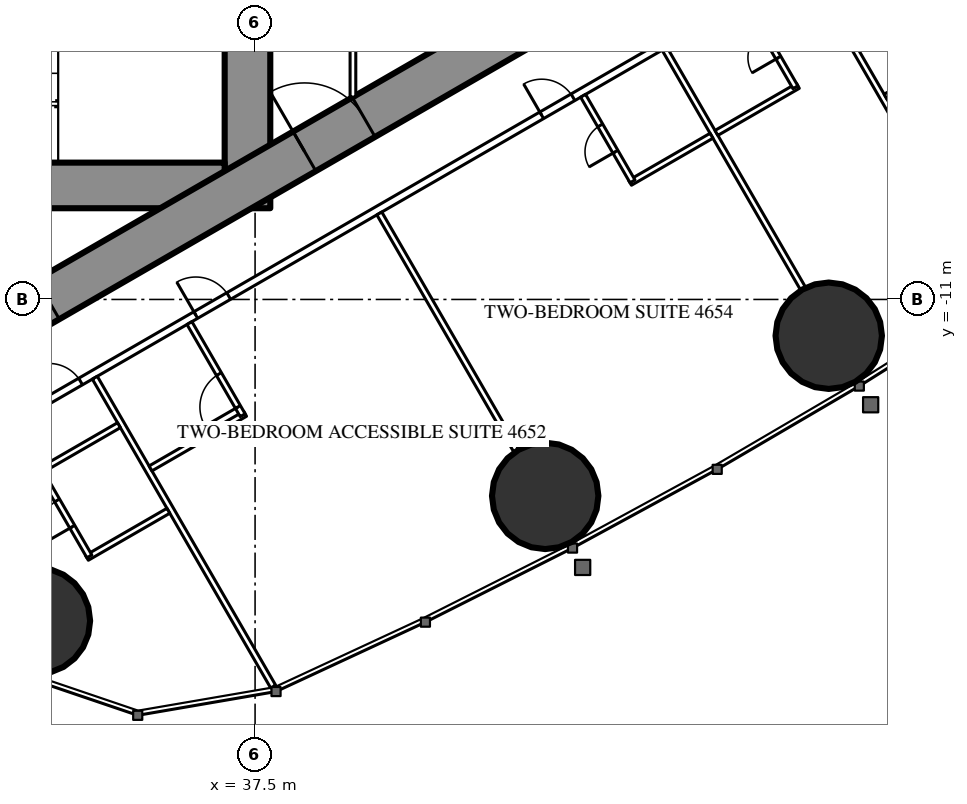
"""IFC4 building model, lengths in metres.
Left out: names, types, materials, properties, quantities, classifications, styles, units other than length and angle.
Written with IfcOpenShell. Run it as: python <this file> out.ifc"""

import sys

from ifc_helpers import new_model, si_unit, direction, frame, frame_2d, origin, origin_2d, place, context, subcontext, project, spatial, rectangle, circle, extrude, element, fill, save


model = new_model("IFC4")
c1 = context("Model", 3, precision=1e-05, world=origin(), true_north=direction((0.0, 1.0)))
c2 = subcontext(c1, "Body", "Model", "MODEL_VIEW")
j1 = project(units=[si_unit("LENGTHUNIT", "METRE"), si_unit("PLANEANGLEUNIT", "RADIAN")], contexts=[c1])
p1 = place(None, origin())
s1 = spatial("IfcSite", under=j1, at=p1, CompositionType="ELEMENT")
p2 = place(p1, origin())
s2 = spatial("IfcBuilding", under=s1, at=p2, CompositionType="ELEMENT")
p3 = place(p2, frame((0.0, 0.0, 173.8)))
s3 = spatial("IfcBuildingStorey", under=s2, at=p3, CompositionType="ELEMENT", Elevation=173.8)
for number, where, z_axis, x_axis in (
    (1, (31.76, -19.456, 0.0), (0.0, 0.0, 1.0), (1.0, 0.0, 0.0)),
    (2, (45.134, -16.168, 0.0), (0.0, 0.0, 1.0), (1.0, 0.0, 0.0)),
    (3, (52.594, -11.955, 0.0), (0.0, 0.0, 1.0), (1.0, 0.0, 0.0)),
):
    element("IfcColumn", number, at=place(p3, frame(where, z_axis=z_axis, x_axis=x_axis)), inside=s3, PredefinedType="COLUMN", context=c2, shape_type="SweptSolid", body=[
        extrude(circle(Radius=1.4, at=origin_2d()), origin(), (0.0, 0.0, 1.0), 3.5),
    ])
p4 = place(p3, frame((37.3, -8.6, 0.0), z_axis=(0.0, 0.0, 1.0), x_axis=(0.0, 1.0, 0.0)))
e4 = element("IfcWall", 4, at=p4, inside=s3, PredefinedType="SHEAR", context=c2, shape_type="SweptSolid", body=[
    extrude(rectangle(XDim=17.2, YDim=1.2, at=frame_2d((8.6, 0.0))), origin(), (0.0, 0.0, 1.0), 3.5),
])
p5 = place(p4, frame((7.7, 0.0, 0.0)))
e5 = element("IfcOpeningElement", 5, at=p5, cuts=e4, PredefinedType="OPENING", context=c2, shape_type="SweptSolid", body=[
    extrude(rectangle(XDim=1.8, YDim=2.2, at=frame_2d((0.9, 1.1))), frame((0.0, 0.61, 0.0), z_axis=(0.0, -1.0, 0.0), x_axis=(1.0, 0.0, 0.0)), (0.0, 0.0, 1.0), 1.22),
])
p6 = place(p3, frame((28.3, -8.0, 0.0), z_axis=(0.0, 0.0, 1.0), x_axis=(1.0, 0.0, 0.0)))
e6 = element("IfcWall", 6, at=p6, inside=s3, PredefinedType="SHEAR", context=c2, shape_type="SweptSolid", body=[
    extrude(rectangle(XDim=8.4, YDim=1.2, at=frame_2d((4.2, 0.0))), origin(), (0.0, 0.0, 1.0), 3.5),
])
p7 = place(p6, frame((0.25, 0.0, 0.0)))
e7 = element("IfcOpeningElement", 7, at=p7, cuts=e6, PredefinedType="OPENING", context=c2, shape_type="SweptSolid", body=[
    extrude(rectangle(XDim=1.0, YDim=2.2, at=frame_2d((0.5, 1.1))), frame((0.0, 0.61, 0.0), z_axis=(0.0, -1.0, 0.0), x_axis=(1.0, 0.0, 0.0)), (0.0, 0.0, 1.0), 1.22),
])
p8 = place(p3, frame((27.2, -13.8, 0.0), z_axis=(0.0, 0.0, 1.0), x_axis=(0.866027159892, 0.499996958321, 0.0)))
e8 = element("IfcWall", 8, at=p8, inside=s3, PredefinedType="SHEAR", context=c2, shape_type="SweptSolid", body=[
    extrude(rectangle(XDim=27.947, YDim=1.2, at=frame_2d((13.973, 0.0))), origin(), (0.0, 0.0, 1.0), 3.5),
])
p9 = place(p8, frame((4.6, 0.0, 0.0)))
e9 = element("IfcOpeningElement", 9, at=p9, cuts=e8, PredefinedType="OPENING", context=c2, shape_type="SweptSolid", body=[
    extrude(rectangle(XDim=1.0, YDim=2.2, at=frame_2d((0.5, 1.1))), frame((0.0, 0.61, 0.0), z_axis=(0.0, -1.0, 0.0), x_axis=(1.0, 0.0, 0.0)), (0.0, 0.0, 1.0), 1.22),
])
p10 = place(p8, frame((13.395, 0.0, 0.0)))
e10 = element("IfcOpeningElement", 10, at=p10, cuts=e8, PredefinedType="OPENING", context=c2, shape_type="SweptSolid", body=[
    extrude(rectangle(XDim=1.8, YDim=2.2, at=frame_2d((0.9, 1.1))), frame((0.0, 0.61, 0.0), z_axis=(0.0, -1.0, 0.0), x_axis=(1.0, 0.0, 0.0)), (0.0, 0.0, 1.0), 1.22),
])
p11 = place(p3, frame((27.959, -16.017, 0.0), z_axis=(0.0, 0.0, 1.0), x_axis=(0.866024151371, 0.500002169237, 0.0)))
e11 = element("IfcWall", 11, at=p11, inside=s3, PredefinedType="PARTITIONING", context=c2, shape_type="SweptSolid", body=[
    extrude(rectangle(XDim=32.034, YDim=0.2, at=frame_2d((16.017, 0.0))), origin(), (0.0, 0.0, 1.0), 3.25),
])
p12 = place(p11, frame((4.765, 0.0, 0.0)))
e12 = element("IfcOpeningElement", 12, at=p12, cuts=e11, PredefinedType="OPENING", context=c2, shape_type="SweptSolid", body=[
    extrude(rectangle(XDim=0.95, YDim=2.2, at=frame_2d((0.475, 1.1))), frame((0.0, 0.11, 0.0), z_axis=(0.0, -1.0, 0.0), x_axis=(1.0, 0.0, 0.0)), (0.0, 0.0, 1.0), 0.22),
])
p13 = place(p11, frame((9.215, 0.0, 0.0)))
e13 = element("IfcOpeningElement", 13, at=p13, cuts=e11, PredefinedType="OPENING", context=c2, shape_type="SweptSolid", body=[
    extrude(rectangle(XDim=1.0, YDim=2.2, at=frame_2d((0.5, 1.1))), frame((0.0, 0.11, 0.0), z_axis=(0.0, -1.0, 0.0), x_axis=(1.0, 0.0, 0.0)), (0.0, 0.0, 1.0), 0.22),
])
p14 = place(p11, frame((19.725, 0.0, 0.0)))
e14 = element("IfcOpeningElement", 14, at=p14, cuts=e11, PredefinedType="OPENING", context=c2, shape_type="SweptSolid", body=[
    extrude(rectangle(XDim=0.95, YDim=2.2, at=frame_2d((0.475, 1.1))), frame((0.0, 0.11, 0.0), z_axis=(0.0, -1.0, 0.0), x_axis=(1.0, 0.0, 0.0)), (0.0, 0.0, 1.0), 0.22),
])
p15 = place(p11, frame((26.125, 0.0, 0.0)))
e15 = element("IfcOpeningElement", 15, at=p15, cuts=e11, PredefinedType="OPENING", context=c2, shape_type="SweptSolid", body=[
    extrude(rectangle(XDim=0.95, YDim=2.2, at=frame_2d((0.475, 1.1))), frame((0.0, 0.11, 0.0), z_axis=(0.0, -1.0, 0.0), x_axis=(1.0, 0.0, 0.0)), (0.0, 0.0, 1.0), 0.22),
])
p16 = place(p11, frame((28.106, 0.0, 0.0)))
e16 = element("IfcOpeningElement", 16, at=p16, cuts=e11, PredefinedType="OPENING", context=c2, shape_type="SweptSolid", body=[
    extrude(rectangle(XDim=0.95, YDim=2.2, at=frame_2d((0.475, 1.1))), frame((0.0, 0.11, 0.0), z_axis=(0.0, -1.0, 0.0), x_axis=(1.0, 0.0, 0.0)), (0.0, 0.0, 1.0), 0.22),
])
p17 = place(p3, frame((33.284, -13.059, 0.0), z_axis=(0.0, 0.0, 1.0), x_axis=(0.499985904184, -0.866033541855, 0.0)))
e17 = element("IfcWall", 17, at=p17, inside=s3, PredefinedType="PARTITIONING", context=c2, shape_type="SweptSolid", body=[
    extrude(rectangle(XDim=9.385, YDim=0.15, at=frame_2d((4.693, 0.0))), origin(), (0.0, 0.0, 1.0), 3.25),
])
p18 = place(p3, frame((40.769, -8.737, 0.0), z_axis=(0.0, 0.0, 1.0), x_axis=(0.500013115284, -0.866017831539, 0.0)))
e18 = element("IfcWall", 18, at=p18, inside=s3, PredefinedType="PARTITIONING", context=c2, shape_type="SweptSolid", body=[
    extrude(rectangle(XDim=7.198, YDim=0.15, at=frame_2d((3.599, 0.0))), origin(), (0.0, 0.0, 1.0), 2.3),
])
p19 = place(p3, frame((48.275, -4.404, 0.0), z_axis=(0.0, 0.0, 1.0), x_axis=(0.500006004368, -0.866021937133, 0.0)))
e19 = element("IfcWall", 19, at=p19, inside=s3, PredefinedType="PARTITIONING", context=c2, shape_type="SweptSolid", body=[
    extrude(rectangle(XDim=7.279, YDim=0.15, at=frame_2d((3.64, 0.0))), origin(), (0.0, 0.0, 1.0), 2.3),
])
p20 = place(p3, frame((52.025, -2.238, 0.0), z_axis=(0.0, 0.0, 1.0), x_axis=(0.499983785035, -0.866034765296, 0.0)))
e20 = element("IfcWall", 20, at=p20, inside=s3, PredefinedType="PARTITIONING", context=c2, shape_type="SweptSolid", body=[
    extrude(rectangle(XDim=7.116, YDim=0.15, at=frame_2d((3.558, 0.0))), origin(), (0.0, 0.0, 1.0), 2.3),
])
p21 = place(p3, frame((33.075, -17.798, 0.0), z_axis=(0.0, 0.0, 1.0), x_axis=(0.866006523861, 0.500032699561, 0.0)))
e21 = element("IfcWall", 21, at=p21, inside=s3, PredefinedType="PARTITIONING", context=c2, shape_type="SweptSolid", body=[
    extrude(rectangle(XDim=2.475, YDim=0.15, at=frame_2d((1.237, 0.0))), origin(), (0.0, 0.0, 1.0), 3.25),
])
p22 = place(p3, frame((31.84, -15.509, 0.0), z_axis=(0.0, 0.0, 1.0), x_axis=(0.500006934395, -0.866021400173, 0.0)))
e22 = element("IfcWall", 22, at=p22, inside=s3, PredefinedType="PARTITIONING", context=c2, shape_type="SweptSolid", body=[
    extrude(rectangle(XDim=2.6, YDim=0.15, at=frame_2d((1.3, 0.0))), origin(), (0.0, 0.0, 1.0), 3.25),
])
p23 = place(p22, frame((0.9, 0.0, 0.0)))
e23 = element("IfcOpeningElement", 23, at=p23, cuts=e22, PredefinedType="OPENING", context=c2, shape_type="SweptSolid", body=[
    extrude(rectangle(XDim=0.8, YDim=2.2, at=frame_2d((0.4, 1.1))), frame((0.0, 0.085, 0.0), z_axis=(0.0, -1.0, 0.0), x_axis=(1.0, 0.0, 0.0)), (0.0, 0.0, 1.0), 0.17),
])
p24 = place(p3, frame((31.775, -15.546, 0.0), z_axis=(0.0, 0.0, 1.0), x_axis=(0.866031185235, 0.4999899861, 0.0)))
e24 = element("IfcWall", 24, at=p24, inside=s3, PredefinedType="PARTITIONING", context=c2, shape_type="SweptSolid", body=[
    extrude(rectangle(XDim=2.475, YDim=0.15, at=frame_2d((1.238, 0.0))), origin(), (0.0, 0.0, 1.0), 3.25),
])
p25 = place(p3, frame((34.749, -15.446, 0.0), z_axis=(0.0, 0.0, 1.0), x_axis=(0.866018712932, 0.500011588718, 0.0)))
e25 = element("IfcWall", 25, at=p25, inside=s3, PredefinedType="PARTITIONING", context=c2, shape_type="SweptSolid", body=[
    extrude(rectangle(XDim=2.875, YDim=0.15, at=frame_2d((1.438, 0.0))), origin(), (0.0, 0.0, 1.0), 3.25),
])
p26 = place(p3, frame((35.773, -11.621, 0.0), z_axis=(0.0, 0.0, 1.0), x_axis=(0.49998411664, -0.866034573852, 0.0)))
e26 = element("IfcWall", 26, at=p26, inside=s3, PredefinedType="PARTITIONING", context=c2, shape_type="SweptSolid", body=[
    extrude(rectangle(XDim=2.8, YDim=0.15, at=frame_2d((1.4, 0.0))), origin(), (0.0, 0.0, 1.0), 3.25),
])
p27 = place(p26, frame((1.55, 0.0, 0.0)))
e27 = element("IfcOpeningElement", 27, at=p27, cuts=e26, PredefinedType="OPENING", context=c2, shape_type="SweptSolid", body=[
    extrude(rectangle(XDim=1.0, YDim=2.2, at=frame_2d((0.5, 1.1))), frame((0.0, 0.085, 0.0), z_axis=(0.0, -1.0, 0.0), x_axis=(1.0, 0.0, 0.0)), (0.0, 0.0, 1.0), 0.17),
])
p28 = place(p3, frame((47.366, -7.93, 0.0), z_axis=(0.0, 0.0, 1.0), x_axis=(0.866031185235, 0.4999899861, 0.0)))
e28 = element("IfcWall", 28, at=p28, inside=s3, PredefinedType="PARTITIONING", context=c2, shape_type="SweptSolid", body=[
    extrude(rectangle(XDim=2.475, YDim=0.15, at=frame_2d((1.238, 0.0))), origin(), (0.0, 0.0, 1.0), 3.25),
])
p29 = place(p3, frame((46.131, -5.641, 0.0), z_axis=(0.0, 0.0, 1.0), x_axis=(0.49997716683, -0.86603858612, 0.0)))
e29 = element("IfcWall", 29, at=p29, inside=s3, PredefinedType="PARTITIONING", context=c2, shape_type="SweptSolid", body=[
    extrude(rectangle(XDim=2.6, YDim=0.15, at=frame_2d((1.3, 0.0))), origin(), (0.0, 0.0, 1.0), 3.25),
])
p30 = place(p29, frame((0.9, 0.0, 0.0)))
e30 = element("IfcOpeningElement", 30, at=p30, cuts=e29, PredefinedType="OPENING", context=c2, shape_type="SweptSolid", body=[
    extrude(rectangle(XDim=0.8, YDim=2.2, at=frame_2d((0.4, 1.1))), frame((0.0, 0.085, 0.0), z_axis=(0.0, -1.0, 0.0), x_axis=(1.0, 0.0, 0.0)), (0.0, 0.0, 1.0), 0.17),
])
p31 = place(p3, frame((49.64, -6.618, 0.0), z_axis=(0.0, 0.0, 1.0), x_axis=(0.866006523861, 0.500032699561, 0.0)))
e31 = element("IfcWall", 31, at=p31, inside=s3, PredefinedType="PARTITIONING", context=c2, shape_type="SweptSolid", body=[
    extrude(rectangle(XDim=2.475, YDim=0.15, at=frame_2d((1.237, 0.0))), origin(), (0.0, 0.0, 1.0), 3.25),
])
p32 = place(p3, frame((50.418, -3.166, 0.0), z_axis=(0.0, 0.0, 1.0), x_axis=(0.499936506574, -0.866062058628, 0.0)))
e32 = element("IfcWall", 32, at=p32, inside=s3, PredefinedType="PARTITIONING", context=c2, shape_type="SweptSolid", body=[
    extrude(rectangle(XDim=2.6, YDim=0.15, at=frame_2d((1.3, 0.0))), origin(), (0.0, 0.0, 1.0), 3.25),
])
p33 = place(p32, frame((0.9, 0.0, 0.0)))
e33 = element("IfcOpeningElement", 33, at=p33, cuts=e32, PredefinedType="OPENING", context=c2, shape_type="SweptSolid", body=[
    extrude(rectangle(XDim=0.8, YDim=2.2, at=frame_2d((0.4, 1.1))), frame((0.0, 0.085, 0.0), z_axis=(0.0, -1.0, 0.0), x_axis=(1.0, 0.0, 0.0)), (0.0, 0.0, 1.0), 0.17),
])
p34 = place(p3, frame((54.09, -5.665, 0.0), z_axis=(0.0, 0.0, 1.0), x_axis=(0.866006523861, 0.500032699561, 0.0)))
e34 = element("IfcWall", 34, at=p34, inside=s3, PredefinedType="PARTITIONING", context=c2, shape_type="SweptSolid", body=[
    extrude(rectangle(XDim=2.475, YDim=0.15, at=frame_2d((1.237, 0.0))), origin(), (0.0, 0.0, 1.0), 3.25),
])
p35 = place(p3, frame((40.075, -5.674, 0.0), z_axis=(0.0, 0.0, 1.0), x_axis=(0.0, 1.0, 0.0)))
e35 = element("IfcWall", 35, at=p35, inside=s3, PredefinedType="PARTITIONING", context=c2, shape_type="SweptSolid", body=[
    extrude(rectangle(XDim=6.874, YDim=0.15, at=frame_2d((3.437, 0.0))), origin(), (0.0, 0.0, 1.0), 3.25),
])
p36 = place(p35, frame((2.537, 0.0, 0.0)))
e36 = element("IfcOpeningElement", 36, at=p36, cuts=e35, PredefinedType="OPENING", context=c2, shape_type="SweptSolid", body=[
    extrude(rectangle(XDim=1.8, YDim=2.2, at=frame_2d((0.9, 1.1))), frame((0.0, 0.085, 0.0), z_axis=(0.0, -1.0, 0.0), x_axis=(1.0, 0.0, 0.0)), (0.0, 0.0, 1.0), 0.17),
])
p37 = place(p23, origin())
e37 = element("IfcDoor", 37, at=p37, inside=s3, OperationType="SINGLE_SWING_RIGHT", PredefinedType="DOOR", context=c2, shape_type="SweptSolid", body=[
    extrude(rectangle(XDim=0.8, YDim=2.2, at=frame_2d((0.4, 1.1))), frame((0.0, 0.025, 0.0), z_axis=(0.0, -1.0, 0.0), x_axis=(1.0, 0.0, 0.0)), (0.0, 0.0, 1.0), 0.05),
])
fill(e23, e37)
p38 = place(p12, origin())
e38 = element("IfcDoor", 38, at=p38, inside=s3, OperationType="SINGLE_SWING_LEFT", PredefinedType="DOOR", context=c2, shape_type="SweptSolid", body=[
    extrude(rectangle(XDim=0.95, YDim=2.2, at=frame_2d((0.475, 1.1))), frame((0.0, 0.025, 0.0), z_axis=(0.0, -1.0, 0.0), x_axis=(1.0, 0.0, 0.0)), (0.0, 0.0, 1.0), 0.05),
])
fill(e12, e38)
p39 = place(p27, origin())
e39 = element("IfcDoor", 39, at=p39, inside=s3, OperationType="SINGLE_SWING_RIGHT", PredefinedType="DOOR", context=c2, shape_type="SweptSolid", body=[
    extrude(rectangle(XDim=1.0, YDim=2.2, at=frame_2d((0.5, 1.1))), frame((0.0, 0.025, 0.0), z_axis=(0.0, -1.0, 0.0), x_axis=(1.0, 0.0, 0.0)), (0.0, 0.0, 1.0), 0.05),
])
fill(e27, e39)
p40 = place(p13, origin())
e40 = element("IfcDoor", 40, at=p40, inside=s3, OperationType="SINGLE_SWING_LEFT", PredefinedType="DOOR", context=c2, shape_type="SweptSolid", body=[
    extrude(rectangle(XDim=1.0, YDim=2.2, at=frame_2d((0.5, 1.1))), frame((0.0, 0.025, 0.0), z_axis=(0.0, -1.0, 0.0), x_axis=(1.0, 0.0, 0.0)), (0.0, 0.0, 1.0), 0.05),
])
fill(e13, e40)
p41 = place(p30, origin())
e41 = element("IfcDoor", 41, at=p41, inside=s3, OperationType="SINGLE_SWING_RIGHT", PredefinedType="DOOR", context=c2, shape_type="SweptSolid", body=[
    extrude(rectangle(XDim=0.8, YDim=2.2, at=frame_2d((0.4, 1.1))), frame((0.0, 0.025, 0.0), z_axis=(0.0, -1.0, 0.0), x_axis=(1.0, 0.0, 0.0)), (0.0, 0.0, 1.0), 0.05),
])
fill(e30, e41)
p42 = place(p14, origin())
e42 = element("IfcDoor", 42, at=p42, inside=s3, OperationType="SINGLE_SWING_LEFT", PredefinedType="DOOR", context=c2, shape_type="SweptSolid", body=[
    extrude(rectangle(XDim=0.95, YDim=2.2, at=frame_2d((0.475, 1.1))), frame((0.0, 0.025, 0.0), z_axis=(0.0, -1.0, 0.0), x_axis=(1.0, 0.0, 0.0)), (0.0, 0.0, 1.0), 0.05),
])
fill(e14, e42)
p43 = place(p33, origin())
e43 = element("IfcDoor", 43, at=p43, inside=s3, OperationType="SINGLE_SWING_RIGHT", PredefinedType="DOOR", context=c2, shape_type="SweptSolid", body=[
    extrude(rectangle(XDim=0.8, YDim=2.2, at=frame_2d((0.4, 1.1))), frame((0.0, 0.025, 0.0), z_axis=(0.0, -1.0, 0.0), x_axis=(1.0, 0.0, 0.0)), (0.0, 0.0, 1.0), 0.05),
])
fill(e33, e43)
p44 = place(p10, origin())
e44 = element("IfcDoor", 44, at=p44, inside=s3, OperationType="DOUBLE_DOOR_SINGLE_SWING", PredefinedType="DOOR", context=c2, shape_type="SweptSolid", body=[
    extrude(rectangle(XDim=1.8, YDim=2.2, at=frame_2d((0.9, 1.1))), frame((0.0, 0.025, 0.0), z_axis=(0.0, -1.0, 0.0), x_axis=(1.0, 0.0, 0.0)), (0.0, 0.0, 1.0), 0.05),
])
fill(e10, e44)
save(model, sys.argv[1])
